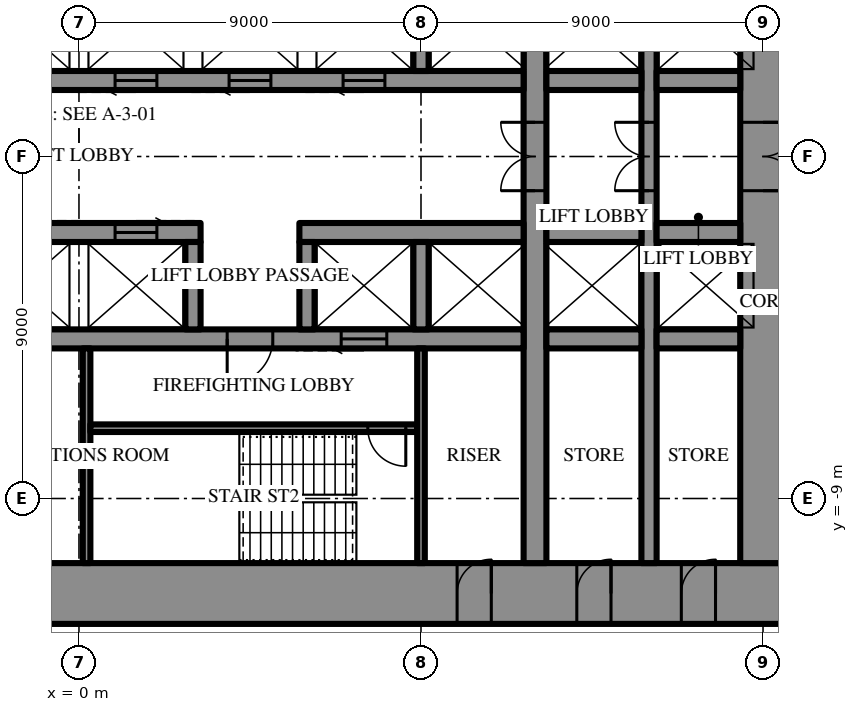
"""IFC4 building model, lengths in metres.
Left out: names, types, materials, properties, quantities, classifications, styles, units other than length and angle.
Written with IfcOpenShell. Run it as: python <this file> out.ifc"""

import sys

from ifc_helpers import new_model, si_unit, direction, frame, frame_2d, origin, place, context, subcontext, project, spatial, rectangle, extrude, element, fill, save


model = new_model("IFC4")
c1 = context("Model", 3, precision=1e-05, world=origin(), true_north=direction((0.0, 1.0)))
c2 = subcontext(c1, "Body", "Model", "MODEL_VIEW")
j1 = project(units=[si_unit("LENGTHUNIT", "METRE"), si_unit("PLANEANGLEUNIT", "RADIAN")], contexts=[c1])
p1 = place(None, origin())
s1 = spatial("IfcSite", under=j1, at=p1, CompositionType="ELEMENT")
p2 = place(p1, origin())
s2 = spatial("IfcBuilding", under=s1, at=p2, CompositionType="ELEMENT")
p3 = place(p2, frame((0.0, 0.0, 44.5)))
s3 = spatial("IfcBuildingStorey", under=s2, at=p3, CompositionType="ELEMENT", Elevation=44.5)
p4 = place(p3, frame((18.6, -11.5, 0.0), z_axis=(0.0, 0.0, 1.0), x_axis=(-1.0, 0.0, 0.0)))
e1 = element("IfcWall", 1, at=p4, inside=s3, PredefinedType="SHEAR", context=c2, shape_type="SweptSolid", body=[
    extrude(rectangle(XDim=37.2, YDim=1.6, at=frame_2d((18.6, 0.0))), origin(), (0.0, 0.0, 1.0), 4.2),
])
p5 = place(p4, frame((19.45, 0.0, 0.0)))
e2 = element("IfcOpeningElement", 2, at=p5, cuts=e1, PredefinedType="OPENING", context=c2, shape_type="SweptSolid", body=[
    extrude(rectangle(XDim=0.9, YDim=2.2, at=frame_2d((0.45, 1.1))), frame((0.0, 0.81, 0.0), z_axis=(0.0, -1.0, 0.0), x_axis=(1.0, 0.0, 0.0)), (0.0, 0.0, 1.0), 1.62),
])
p6 = place(p4, frame((22.45, 0.0, 0.0)))
e3 = element("IfcOpeningElement", 3, at=p6, cuts=e1, PredefinedType="OPENING", context=c2, shape_type="SweptSolid", body=[
    extrude(rectangle(XDim=0.9, YDim=2.2, at=frame_2d((0.45, 1.1))), frame((0.0, 0.81, 0.0), z_axis=(0.0, -1.0, 0.0), x_axis=(1.0, 0.0, 0.0)), (0.0, 0.0, 1.0), 1.62),
])
p7 = place(p4, frame((25.5, 0.0, 0.0)))
e4 = element("IfcOpeningElement", 4, at=p7, cuts=e1, PredefinedType="OPENING", context=c2, shape_type="SweptSolid", body=[
    extrude(rectangle(XDim=1.0, YDim=2.2, at=frame_2d((0.5, 1.1))), frame((0.0, 0.81, 0.0), z_axis=(0.0, -1.0, 0.0), x_axis=(1.0, 0.0, 0.0)), (0.0, 0.0, 1.0), 1.62),
])
p8 = place(p4, frame((1.85, 0.0, 0.0)))
e5 = element("IfcOpeningElement", 5, at=p8, cuts=e1, PredefinedType="OPENING", context=c2, shape_type="SweptSolid", body=[
    extrude(rectangle(XDim=0.9, YDim=2.2, at=frame_2d((0.45, 1.1))), frame((0.0, 0.81, 0.0), z_axis=(0.0, -1.0, 0.0), x_axis=(1.0, 0.0, 0.0)), (0.0, 0.0, 1.0), 1.62),
])
p9 = place(p4, frame((4.6, 0.0, 0.0)))
e6 = element("IfcOpeningElement", 6, at=p9, cuts=e1, PredefinedType="OPENING", context=c2, shape_type="SweptSolid", body=[
    extrude(rectangle(XDim=0.9, YDim=2.2, at=frame_2d((0.45, 1.1))), frame((0.0, 0.81, 0.0), z_axis=(0.0, -1.0, 0.0), x_axis=(1.0, 0.0, 0.0)), (0.0, 0.0, 1.0), 1.62),
])
p10 = place(p4, frame((7.75, 0.0, 0.0)))
e7 = element("IfcOpeningElement", 7, at=p10, cuts=e1, PredefinedType="OPENING", context=c2, shape_type="SweptSolid", body=[
    extrude(rectangle(XDim=0.9, YDim=2.2, at=frame_2d((0.45, 1.1))), frame((0.0, 0.81, 0.0), z_axis=(0.0, -1.0, 0.0), x_axis=(1.0, 0.0, 0.0)), (0.0, 0.0, 1.0), 1.62),
])
p11 = place(p4, frame((28.55, 0.0, 0.0)))
e8 = element("IfcOpeningElement", 8, at=p11, cuts=e1, PredefinedType="OPENING", context=c2, shape_type="SweptSolid", body=[
    extrude(rectangle(XDim=0.9, YDim=2.2, at=frame_2d((0.45, 1.1))), frame((0.0, 0.81, 0.0), z_axis=(0.0, -1.0, 0.0), x_axis=(1.0, 0.0, 0.0)), (0.0, 0.0, 1.0), 1.62),
])
p12 = place(p4, frame((31.7, 0.0, 0.0)))
e9 = element("IfcOpeningElement", 9, at=p12, cuts=e1, PredefinedType="OPENING", context=c2, shape_type="SweptSolid", body=[
    extrude(rectangle(XDim=0.9, YDim=2.2, at=frame_2d((0.45, 1.1))), frame((0.0, 0.81, 0.0), z_axis=(0.0, -1.0, 0.0), x_axis=(1.0, 0.0, 0.0)), (0.0, 0.0, 1.0), 1.62),
])
p13 = place(p4, frame((34.45, 0.0, 0.0)))
e10 = element("IfcOpeningElement", 10, at=p13, cuts=e1, PredefinedType="OPENING", context=c2, shape_type="SweptSolid", body=[
    extrude(rectangle(XDim=0.9, YDim=2.2, at=frame_2d((0.45, 1.1))), frame((0.0, 0.81, 0.0), z_axis=(0.0, -1.0, 0.0), x_axis=(1.0, 0.0, 0.0)), (0.0, 0.0, 1.0), 1.62),
])
p14 = place(p3, frame((18.0, -10.7, 0.0), z_axis=(0.0, 0.0, 1.0), x_axis=(0.0, 1.0, 0.0)))
e11 = element("IfcWall", 11, at=p14, inside=s3, PredefinedType="SHEAR", context=c2, shape_type="SweptSolid", body=[
    extrude(rectangle(XDim=21.4, YDim=1.2, at=frame_2d((10.7, 0.0))), origin(), (0.0, 0.0, 1.0), 4.2),
])
p15 = place(p14, frame((9.8, 0.0, 0.0)))
e12 = element("IfcOpeningElement", 12, at=p15, cuts=e11, PredefinedType="OPENING", context=c2, shape_type="SweptSolid", body=[
    extrude(rectangle(XDim=1.8, YDim=2.4, at=frame_2d((0.9, 1.2))), frame((0.0, 0.61, 0.0), z_axis=(0.0, -1.0, 0.0), x_axis=(1.0, 0.0, 0.0)), (0.0, 0.0, 1.0), 1.22),
])
p16 = place(p3, frame((12.0, -10.7, 0.0), z_axis=(0.0, 0.0, 1.0), x_axis=(0.0, 1.0, 0.0)))
e13 = element("IfcWall", 13, at=p16, inside=s3, PredefinedType="SHEAR", context=c2, shape_type="SweptSolid", body=[
    extrude(rectangle(XDim=21.4, YDim=0.6, at=frame_2d((10.7, 0.0))), origin(), (0.0, 0.0, 1.0), 4.2),
])
p17 = place(p16, frame((9.8, 0.0, 0.0)))
e14 = element("IfcOpeningElement", 14, at=p17, cuts=e13, PredefinedType="OPENING", context=c2, shape_type="SweptSolid", body=[
    extrude(rectangle(XDim=1.8, YDim=2.4, at=frame_2d((0.9, 1.2))), frame((0.0, 0.31, 0.0), z_axis=(0.0, -1.0, 0.0), x_axis=(1.0, 0.0, 0.0)), (0.0, 0.0, 1.0), 0.62),
])
p18 = place(p3, frame((15.0, -10.7, 0.0), z_axis=(0.0, 0.0, 1.0), x_axis=(0.0, 1.0, 0.0)))
e15 = element("IfcWall", 15, at=p18, inside=s3, PredefinedType="SHEAR", context=c2, shape_type="SweptSolid", body=[
    extrude(rectangle(XDim=21.4, YDim=0.4, at=frame_2d((10.7, 0.0))), origin(), (0.0, 0.0, 1.0), 4.2),
])
p19 = place(p18, frame((9.8, 0.0, 0.0)))
e16 = element("IfcOpeningElement", 16, at=p19, cuts=e15, PredefinedType="OPENING", context=c2, shape_type="SweptSolid", body=[
    extrude(rectangle(XDim=1.8, YDim=2.4, at=frame_2d((0.9, 1.2))), frame((0.0, 0.21, 0.0), z_axis=(0.0, -1.0, 0.0), x_axis=(1.0, 0.0, 0.0)), (0.0, 0.0, 1.0), 0.42),
])
p20 = place(p3, frame((-3.2, 2.0, 0.0), z_axis=(0.0, 0.0, 1.0), x_axis=(1.0, 0.0, 0.0)))
e17 = element("IfcWall", 17, at=p20, inside=s3, PredefinedType="SHEAR", context=c2, shape_type="SweptSolid", body=[
    extrude(rectangle(XDim=14.9, YDim=0.5, at=frame_2d((7.45, 0.0))), origin(), (0.0, 0.0, 1.0), 4.2),
])
p21 = place(p20, frame((1.15, 0.0, 0.0)))
e18 = element("IfcOpeningElement", 18, at=p21, cuts=e17, PredefinedType="OPENING", context=c2, shape_type="SweptSolid", body=[
    extrude(rectangle(XDim=1.1, YDim=2.2, at=frame_2d((0.55, 1.1))), frame((0.0, 0.26, 0.0), z_axis=(0.0, -1.0, 0.0), x_axis=(1.0, 0.0, 0.0)), (0.0, 0.0, 1.0), 0.52),
])
p22 = place(p20, frame((4.15, 0.0, 0.0)))
e19 = element("IfcOpeningElement", 19, at=p22, cuts=e17, PredefinedType="OPENING", context=c2, shape_type="SweptSolid", body=[
    extrude(rectangle(XDim=1.1, YDim=2.2, at=frame_2d((0.55, 1.1))), frame((0.0, 0.26, 0.0), z_axis=(0.0, -1.0, 0.0), x_axis=(1.0, 0.0, 0.0)), (0.0, 0.0, 1.0), 0.52),
])
p23 = place(p20, frame((7.15, 0.0, 0.0)))
e20 = element("IfcOpeningElement", 20, at=p23, cuts=e17, PredefinedType="OPENING", context=c2, shape_type="SweptSolid", body=[
    extrude(rectangle(XDim=1.1, YDim=2.2, at=frame_2d((0.55, 1.1))), frame((0.0, 0.26, 0.0), z_axis=(0.0, -1.0, 0.0), x_axis=(1.0, 0.0, 0.0)), (0.0, 0.0, 1.0), 0.52),
])
p24 = place(p20, frame((10.15, 0.0, 0.0)))
e21 = element("IfcOpeningElement", 21, at=p24, cuts=e17, PredefinedType="OPENING", context=c2, shape_type="SweptSolid", body=[
    extrude(rectangle(XDim=1.1, YDim=2.2, at=frame_2d((0.55, 1.1))), frame((0.0, 0.26, 0.0), z_axis=(0.0, -1.0, 0.0), x_axis=(1.0, 0.0, 0.0)), (0.0, 0.0, 1.0), 0.52),
])
p25 = place(p3, frame((12.3, 2.0, 0.0), z_axis=(0.0, 0.0, 1.0), x_axis=(1.0, 0.0, 0.0)))
e22 = element("IfcWall", 22, at=p25, inside=s3, PredefinedType="SHEAR", context=c2, shape_type="SweptSolid", body=[
    extrude(rectangle(XDim=2.5, YDim=0.5, at=frame_2d((1.25, 0.0))), origin(), (0.0, 0.0, 1.0), 4.2),
])
p26 = place(p3, frame((15.2, 2.0, 0.0), z_axis=(0.0, 0.0, 1.0), x_axis=(1.0, 0.0, 0.0)))
e23 = element("IfcWall", 23, at=p26, inside=s3, PredefinedType="SHEAR", context=c2, shape_type="SweptSolid", body=[
    extrude(rectangle(XDim=2.2, YDim=0.5, at=frame_2d((1.1, 0.0))), origin(), (0.0, 0.0, 1.0), 4.2),
])
p27 = place(p3, frame((9.0, 2.25, 0.0), z_axis=(0.0, 0.0, 1.0), x_axis=(0.0, 1.0, 0.0)))
e24 = element("IfcWall", 24, at=p27, inside=s3, PredefinedType="SHEAR", context=c2, shape_type="SweptSolid", body=[
    extrude(rectangle(XDim=2.3, YDim=0.4, at=frame_2d((1.15, 0.0))), origin(), (0.0, 0.0, 1.0), 4.2),
])
p28 = place(p3, frame((17.4, -2.0, 0.0), z_axis=(0.0, 0.0, 1.0), x_axis=(-1.0, 0.0, 0.0)))
e25 = element("IfcWall", 25, at=p28, inside=s3, PredefinedType="SHEAR", context=c2, shape_type="SweptSolid", body=[
    extrude(rectangle(XDim=2.2, YDim=0.5, at=frame_2d((1.1, 0.0))), origin(), (0.0, 0.0, 1.0), 4.2),
])
p29 = place(p3, frame((14.8, -2.0, 0.0), z_axis=(0.0, 0.0, 1.0), x_axis=(-1.0, 0.0, 0.0)))
e26 = element("IfcWall", 26, at=p29, inside=s3, PredefinedType="SHEAR", context=c2, shape_type="SweptSolid", body=[
    extrude(rectangle(XDim=2.5, YDim=0.5, at=frame_2d((1.25, 0.0))), origin(), (0.0, 0.0, 1.0), 4.2),
])
p30 = place(p3, frame((11.7, -2.0, 0.0), z_axis=(0.0, 0.0, 1.0), x_axis=(-1.0, 0.0, 0.0)))
e27 = element("IfcWall", 27, at=p30, inside=s3, PredefinedType="SHEAR", context=c2, shape_type="SweptSolid", body=[
    extrude(rectangle(XDim=5.9, YDim=0.5, at=frame_2d((2.95, 0.0))), origin(), (0.0, 0.0, 1.0), 4.2),
])
p31 = place(p3, frame((3.2, -2.0, 0.0), z_axis=(0.0, 0.0, 1.0), x_axis=(-1.0, 0.0, 0.0)))
e28 = element("IfcWall", 28, at=p31, inside=s3, PredefinedType="SHEAR", context=c2, shape_type="SweptSolid", body=[
    extrude(rectangle(XDim=14.9, YDim=0.5, at=frame_2d((7.45, 0.0))), origin(), (0.0, 0.0, 1.0), 4.2),
])
p32 = place(p31, frame((1.15, 0.0, 0.0)))
e29 = element("IfcOpeningElement", 29, at=p32, cuts=e28, PredefinedType="OPENING", context=c2, shape_type="SweptSolid", body=[
    extrude(rectangle(XDim=1.1, YDim=2.2, at=frame_2d((0.55, 1.1))), frame((0.0, 0.26, 0.0), z_axis=(0.0, -1.0, 0.0), x_axis=(1.0, 0.0, 0.0)), (0.0, 0.0, 1.0), 0.52),
])
p33 = place(p31, frame((4.15, 0.0, 0.0)))
e30 = element("IfcOpeningElement", 30, at=p33, cuts=e28, PredefinedType="OPENING", context=c2, shape_type="SweptSolid", body=[
    extrude(rectangle(XDim=1.1, YDim=2.2, at=frame_2d((0.55, 1.1))), frame((0.0, 0.26, 0.0), z_axis=(0.0, -1.0, 0.0), x_axis=(1.0, 0.0, 0.0)), (0.0, 0.0, 1.0), 0.52),
])
p34 = place(p31, frame((7.15, 0.0, 0.0)))
e31 = element("IfcOpeningElement", 31, at=p34, cuts=e28, PredefinedType="OPENING", context=c2, shape_type="SweptSolid", body=[
    extrude(rectangle(XDim=1.1, YDim=2.2, at=frame_2d((0.55, 1.1))), frame((0.0, 0.26, 0.0), z_axis=(0.0, -1.0, 0.0), x_axis=(1.0, 0.0, 0.0)), (0.0, 0.0, 1.0), 0.52),
])
p35 = place(p31, frame((10.15, 0.0, 0.0)))
e32 = element("IfcOpeningElement", 32, at=p35, cuts=e28, PredefinedType="OPENING", context=c2, shape_type="SweptSolid", body=[
    extrude(rectangle(XDim=1.1, YDim=2.2, at=frame_2d((0.55, 1.1))), frame((0.0, 0.26, 0.0), z_axis=(0.0, -1.0, 0.0), x_axis=(1.0, 0.0, 0.0)), (0.0, 0.0, 1.0), 0.52),
])
p36 = place(p3, frame((17.4, -4.8, 0.0), z_axis=(0.0, 0.0, 1.0), x_axis=(-1.0, 0.0, 0.0)))
e33 = element("IfcWall", 33, at=p36, inside=s3, PredefinedType="SHEAR", context=c2, shape_type="SweptSolid", body=[
    extrude(rectangle(XDim=2.2, YDim=0.5, at=frame_2d((1.1, 0.0))), origin(), (0.0, 0.0, 1.0), 4.2),
])
p37 = place(p3, frame((14.8, -4.8, 0.0), z_axis=(0.0, 0.0, 1.0), x_axis=(-1.0, 0.0, 0.0)))
e34 = element("IfcWall", 34, at=p37, inside=s3, PredefinedType="SHEAR", context=c2, shape_type="SweptSolid", body=[
    extrude(rectangle(XDim=2.5, YDim=0.5, at=frame_2d((1.25, 0.0))), origin(), (0.0, 0.0, 1.0), 4.2),
])
p38 = place(p3, frame((11.7, -4.8, 0.0), z_axis=(0.0, 0.0, 1.0), x_axis=(-1.0, 0.0, 0.0)))
e35 = element("IfcWall", 35, at=p38, inside=s3, PredefinedType="SHEAR", context=c2, shape_type="SweptSolid", body=[
    extrude(rectangle(XDim=23.4, YDim=0.5, at=frame_2d((11.7, 0.0))), origin(), (0.0, 0.0, 1.0), 4.2),
])
p39 = place(p38, frame((6.6, 0.0, 0.0)))
e36 = element("IfcOpeningElement", 36, at=p39, cuts=e35, PredefinedType="OPENING", context=c2, shape_type="SweptSolid", body=[
    extrude(rectangle(XDim=1.2, YDim=2.2, at=frame_2d((0.6, 1.1))), frame((0.0, 0.26, 0.0), z_axis=(0.0, -1.0, 0.0), x_axis=(1.0, 0.0, 0.0)), (0.0, 0.0, 1.0), 0.52),
])
p40 = place(p38, frame((3.6, 0.0, 0.0)))
e37 = element("IfcOpeningElement", 37, at=p40, cuts=e35, PredefinedType="OPENING", context=c2, shape_type="SweptSolid", body=[
    extrude(rectangle(XDim=1.2, YDim=2.2, at=frame_2d((0.6, 1.1))), frame((0.0, 0.26, 0.0), z_axis=(0.0, -1.0, 0.0), x_axis=(1.0, 0.0, 0.0)), (0.0, 0.0, 1.0), 0.52),
])
for number, where, z_axis, x_axis in (
    (38, (9.0, -2.25, 0.0), (0.0, 0.0, 1.0), (0.0, -1.0, 0.0)),
    (39, (6.0, -2.25, 0.0), (0.0, 0.0, 1.0), (0.0, -1.0, 0.0)),
    (40, (3.0, -2.25, 0.0), (0.0, 0.0, 1.0), (0.0, -1.0, 0.0)),
):
    element("IfcWall", number, at=place(p3, frame(where, z_axis=z_axis, x_axis=x_axis)), inside=s3, PredefinedType="SHEAR", context=c2, shape_type="SweptSolid", body=[
        extrude(rectangle(XDim=2.3, YDim=0.4, at=frame_2d((1.15, 0.0))), origin(), (0.0, 0.0, 1.0), 4.2),
    ])
p41 = place(p3, frame((0.2, -5.05, 0.0), z_axis=(0.0, 0.0, 1.0), x_axis=(0.0, -1.0, 0.0)))
e41 = element("IfcWall", 41, at=p41, inside=s3, PredefinedType="SHEAR", context=c2, shape_type="SweptSolid", body=[
    extrude(rectangle(XDim=5.65, YDim=0.2, at=frame_2d((2.825, 0.0))), origin(), (0.0, 0.0, 1.0), 4.2),
])
p42 = place(p3, frame((8.9, -7.15, 0.0), z_axis=(0.0, 0.0, 1.0), x_axis=(-1.0, 0.0, 0.0)))
e42 = element("IfcWall", 42, at=p42, inside=s3, PredefinedType="SHEAR", context=c2, shape_type="SweptSolid", body=[
    extrude(rectangle(XDim=8.6, YDim=0.2, at=frame_2d((4.3, 0.0))), origin(), (0.0, 0.0, 1.0), 4.2),
])
p43 = place(p42, frame((0.3, 0.0, 0.0)))
e43 = element("IfcOpeningElement", 43, at=p43, cuts=e42, PredefinedType="OPENING", context=c2, shape_type="SweptSolid", body=[
    extrude(rectangle(XDim=1.0, YDim=2.2, at=frame_2d((0.5, 1.1))), frame((0.0, 0.11, 0.0), z_axis=(0.0, -1.0, 0.0), x_axis=(1.0, 0.0, 0.0)), (0.0, 0.0, 1.0), 0.22),
])
p44 = place(p3, frame((9.0, -5.05, 0.0), z_axis=(0.0, 0.0, 1.0), x_axis=(0.0, -1.0, 0.0)))
e44 = element("IfcWall", 44, at=p44, inside=s3, PredefinedType="PARTITIONING", context=c2, shape_type="SweptSolid", body=[
    extrude(rectangle(XDim=5.65, YDim=0.2, at=frame_2d((2.825, 0.0))), origin(), (0.0, 0.0, 1.0), 4.0),
])
p45 = place(p15, frame((1.8, 0.0, 0.0), z_axis=(0.0, 0.0, 1.0), x_axis=(-1.0, 0.0, 0.0)))
e45 = element("IfcDoor", 45, at=p45, inside=s3, OperationType="DOUBLE_DOOR_SINGLE_SWING", PredefinedType="DOOR", context=c2, shape_type="SweptSolid", body=[
    extrude(rectangle(XDim=1.8, YDim=2.4, at=frame_2d((0.9, 1.2))), frame((0.0, 0.025, 0.0), z_axis=(0.0, -1.0, 0.0), x_axis=(1.0, 0.0, 0.0)), (0.0, 0.0, 1.0), 0.05),
])
fill(e12, e45)
p46 = place(p39, origin())
e46 = element("IfcDoor", 46, at=p46, inside=s3, OperationType="SINGLE_SWING_LEFT", PredefinedType="DOOR", context=c2, shape_type="SweptSolid", body=[
    extrude(rectangle(XDim=1.2, YDim=2.2, at=frame_2d((0.6, 1.1))), frame((0.0, 0.025, 0.0), z_axis=(0.0, -1.0, 0.0), x_axis=(1.0, 0.0, 0.0)), (0.0, 0.0, 1.0), 0.05),
])
fill(e36, e46)
p47 = place(p43, origin())
e47 = element("IfcDoor", 47, at=p47, inside=s3, OperationType="SINGLE_SWING_RIGHT", PredefinedType="DOOR", context=c2, shape_type="SweptSolid", body=[
    extrude(rectangle(XDim=1.0, YDim=2.2, at=frame_2d((0.5, 1.1))), frame((0.0, 0.025, 0.0), z_axis=(0.0, -1.0, 0.0), x_axis=(1.0, 0.0, 0.0)), (0.0, 0.0, 1.0), 0.05),
])
fill(e43, e47)
p48 = place(p8, frame((0.9, 0.0, 0.0), z_axis=(0.0, 0.0, 1.0), x_axis=(-1.0, 0.0, 0.0)))
e48 = element("IfcDoor", 48, at=p48, inside=s3, OperationType="SINGLE_SWING_LEFT", PredefinedType="DOOR", context=c2, shape_type="SweptSolid", body=[
    extrude(rectangle(XDim=0.9, YDim=2.2, at=frame_2d((0.45, 1.1))), frame((0.0, 0.025, 0.0), z_axis=(0.0, -1.0, 0.0), x_axis=(1.0, 0.0, 0.0)), (0.0, 0.0, 1.0), 0.05),
])
fill(e5, e48)
p49 = place(p9, frame((0.9, 0.0, 0.0), z_axis=(0.0, 0.0, 1.0), x_axis=(-1.0, 0.0, 0.0)))
e49 = element("IfcDoor", 49, at=p49, inside=s3, OperationType="SINGLE_SWING_LEFT", PredefinedType="DOOR", context=c2, shape_type="SweptSolid", body=[
    extrude(rectangle(XDim=0.9, YDim=2.2, at=frame_2d((0.45, 1.1))), frame((0.0, 0.025, 0.0), z_axis=(0.0, -1.0, 0.0), x_axis=(1.0, 0.0, 0.0)), (0.0, 0.0, 1.0), 0.05),
])
fill(e6, e49)
p50 = place(p10, frame((0.9, 0.0, 0.0), z_axis=(0.0, 0.0, 1.0), x_axis=(-1.0, 0.0, 0.0)))
e50 = element("IfcDoor", 50, at=p50, inside=s3, OperationType="SINGLE_SWING_LEFT", PredefinedType="DOOR", context=c2, shape_type="SweptSolid", body=[
    extrude(rectangle(XDim=0.9, YDim=2.2, at=frame_2d((0.45, 1.1))), frame((0.0, 0.025, 0.0), z_axis=(0.0, -1.0, 0.0), x_axis=(1.0, 0.0, 0.0)), (0.0, 0.0, 1.0), 0.05),
])
fill(e7, e50)
p51 = place(p17, origin())
e51 = element("IfcDoor", 51, at=p51, inside=s3, OperationType="DOUBLE_DOOR_SINGLE_SWING", PredefinedType="DOOR", context=c2, shape_type="SweptSolid", body=[
    extrude(rectangle(XDim=1.8, YDim=2.4, at=frame_2d((0.9, 1.2))), frame((0.0, 0.025, 0.0), z_axis=(0.0, -1.0, 0.0), x_axis=(1.0, 0.0, 0.0)), (0.0, 0.0, 1.0), 0.05),
])
fill(e14, e51)
p52 = place(p19, origin())
e52 = element("IfcDoor", 52, at=p52, inside=s3, OperationType="DOUBLE_DOOR_SINGLE_SWING", PredefinedType="DOOR", context=c2, shape_type="SweptSolid", body=[
    extrude(rectangle(XDim=1.8, YDim=2.4, at=frame_2d((0.9, 1.2))), frame((0.0, 0.025, 0.0), z_axis=(0.0, -1.0, 0.0), x_axis=(1.0, 0.0, 0.0)), (0.0, 0.0, 1.0), 0.05),
])
fill(e16, e52)
p53 = place(p22, frame((1.1, 0.0, 0.0), z_axis=(0.0, 0.0, 1.0), x_axis=(-1.0, 0.0, 0.0)))
e53 = element("IfcDoor", 53, at=p53, inside=s3, OperationType="SLIDING_TO_LEFT", PredefinedType="DOOR", context=c2, shape_type="SweptSolid", body=[
    extrude(rectangle(XDim=1.1, YDim=2.2, at=frame_2d((0.55, 1.1))), frame((0.0, 0.025, 0.0), z_axis=(0.0, -1.0, 0.0), x_axis=(1.0, 0.0, 0.0)), (0.0, 0.0, 1.0), 0.05),
])
fill(e19, e53)
p54 = place(p23, frame((1.1, 0.0, 0.0), z_axis=(0.0, 0.0, 1.0), x_axis=(-1.0, 0.0, 0.0)))
e54 = element("IfcDoor", 54, at=p54, inside=s3, OperationType="SLIDING_TO_LEFT", PredefinedType="DOOR", context=c2, shape_type="SweptSolid", body=[
    extrude(rectangle(XDim=1.1, YDim=2.2, at=frame_2d((0.55, 1.1))), frame((0.0, 0.025, 0.0), z_axis=(0.0, -1.0, 0.0), x_axis=(1.0, 0.0, 0.0)), (0.0, 0.0, 1.0), 0.05),
])
fill(e20, e54)
p55 = place(p24, frame((1.1, 0.0, 0.0), z_axis=(0.0, 0.0, 1.0), x_axis=(-1.0, 0.0, 0.0)))
e55 = element("IfcDoor", 55, at=p55, inside=s3, OperationType="SLIDING_TO_LEFT", PredefinedType="DOOR", context=c2, shape_type="SweptSolid", body=[
    extrude(rectangle(XDim=1.1, YDim=2.2, at=frame_2d((0.55, 1.1))), frame((0.0, 0.025, 0.0), z_axis=(0.0, -1.0, 0.0), x_axis=(1.0, 0.0, 0.0)), (0.0, 0.0, 1.0), 0.05),
])
fill(e21, e55)
p56 = place(p40, origin())
e56 = element("IfcDoor", 56, at=p56, inside=s3, OperationType="SLIDING_TO_LEFT", PredefinedType="DOOR", context=c2, shape_type="SweptSolid", body=[
    extrude(rectangle(XDim=1.2, YDim=2.2, at=frame_2d((0.6, 1.1))), frame((0.0, 0.025, 0.0), z_axis=(0.0, -1.0, 0.0), x_axis=(1.0, 0.0, 0.0)), (0.0, 0.0, 1.0), 0.05),
])
fill(e37, e56)
p57 = place(p32, frame((1.1, 0.0, 0.0), z_axis=(0.0, 0.0, 1.0), x_axis=(-1.0, 0.0, 0.0)))
e57 = element("IfcDoor", 57, at=p57, inside=s3, OperationType="SLIDING_TO_LEFT", PredefinedType="DOOR", context=c2, shape_type="SweptSolid", body=[
    extrude(rectangle(XDim=1.1, YDim=2.2, at=frame_2d((0.55, 1.1))), frame((0.0, 0.025, 0.0), z_axis=(0.0, -1.0, 0.0), x_axis=(1.0, 0.0, 0.0)), (0.0, 0.0, 1.0), 0.05),
])
fill(e29, e57)
save(model, sys.argv[1])
